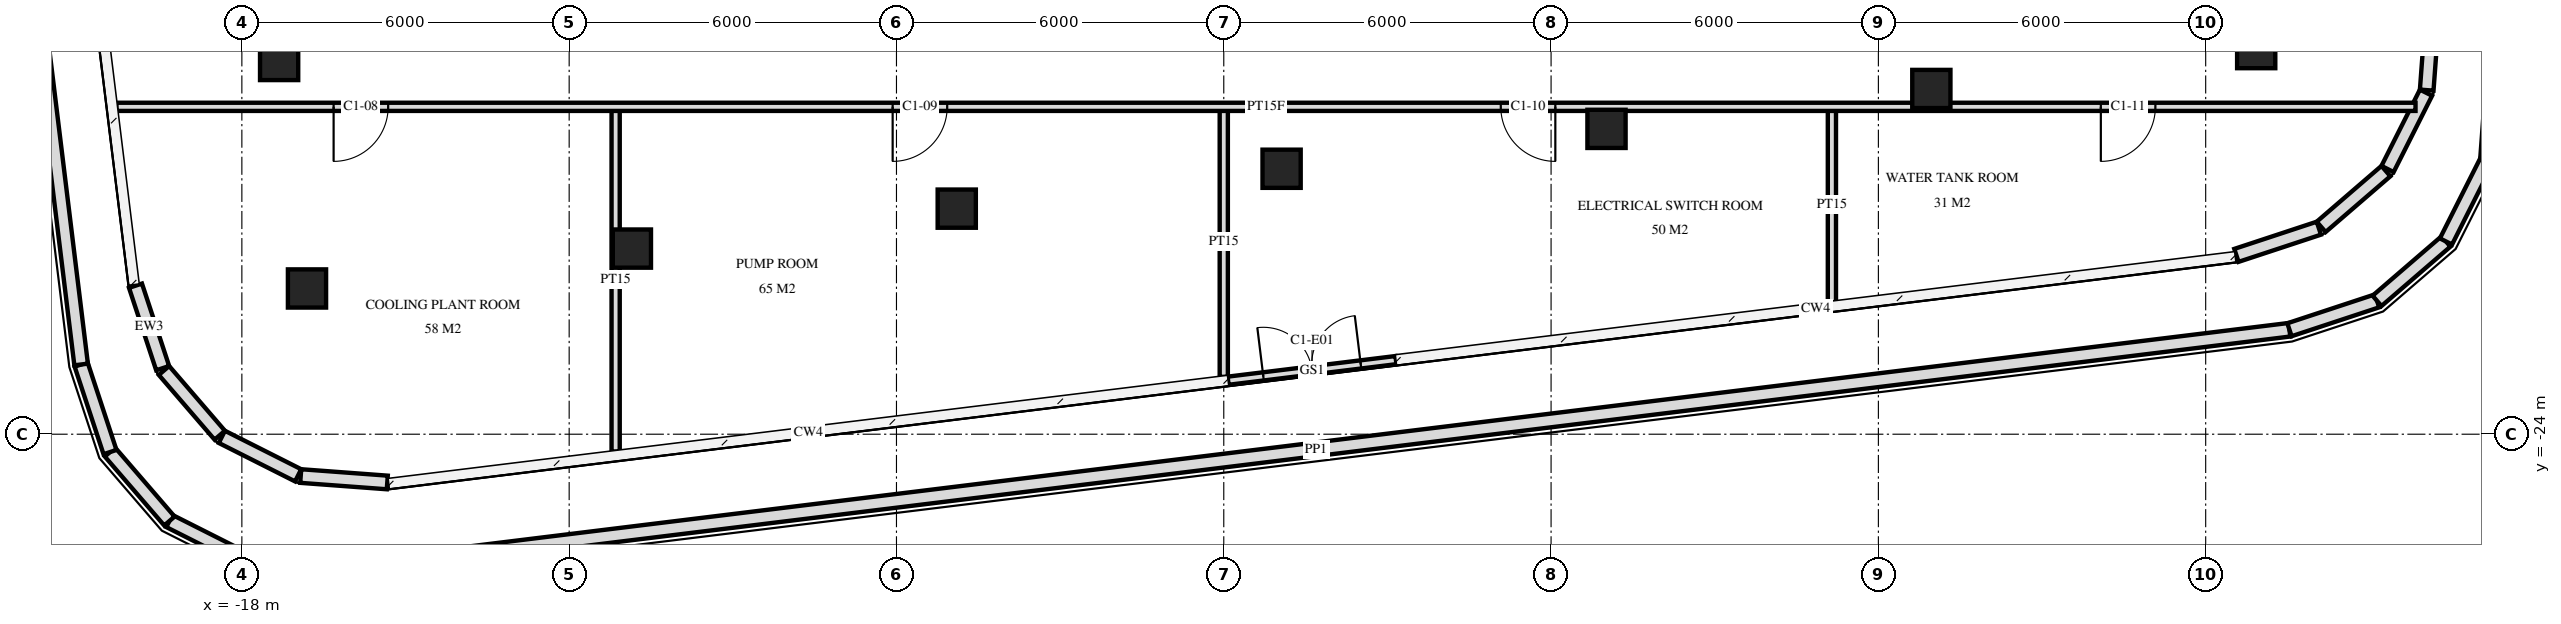
"""IFC4 building model, lengths in metres.
Left out: names, types, materials, properties, quantities, classifications, styles, units other than length and angle.
Written with IfcOpenShell. Run it as: python <this file> out.ifc"""

import sys

from ifc_helpers import new_model, si_unit, direction, frame, frame_2d, origin, origin_2d, place, context, subcontext, project, spatial, rectangle, extrude, element, fill, save


model = new_model("IFC4")
c1 = context("Model", 3, precision=1e-05, world=origin(), true_north=direction((0.0, 1.0)))
c2 = subcontext(c1, "Body", "Model", "MODEL_VIEW")
j1 = project(units=[si_unit("LENGTHUNIT", "METRE"), si_unit("PLANEANGLEUNIT", "RADIAN")], contexts=[c1])
p1 = place(None, origin())
s1 = spatial("IfcSite", under=j1, at=p1, CompositionType="ELEMENT")
p2 = place(p1, origin())
s2 = spatial("IfcBuilding", under=s1, at=p2, CompositionType="ELEMENT")
p3 = place(p2, frame((0.0, 0.0, 346.6)))
s3 = spatial("IfcBuildingStorey", under=s2, at=p3, CompositionType="ELEMENT", Elevation=346.6)
for number, where, z_axis, x_axis in (
    (1, (-17.317, -17.16, 0.0), (0.0, 0.0, 1.0), (1.0, 0.0, 0.0)),
    (2, (-16.806, -21.329, 0.0), (0.0, 0.0, 1.0), (1.0, 0.0, 0.0)),
    (3, (-10.85, -20.598, 0.0), (0.0, 0.0, 1.0), (1.0, 0.0, 0.0)),
    (4, (-4.895, -19.866, 0.0), (0.0, 0.0, 1.0), (1.0, 0.0, 0.0)),
    (5, (1.06, -19.135, 0.0), (0.0, 0.0, 1.0), (1.0, 0.0, 0.0)),
    (6, (7.016, -18.404, 0.0), (0.0, 0.0, 1.0), (1.0, 0.0, 0.0)),
    (7, (12.971, -17.673, 0.0), (0.0, 0.0, 1.0), (1.0, 0.0, 0.0)),
    (8, (18.926, -16.942, 0.0), (0.0, 0.0, 1.0), (1.0, 0.0, 0.0)),
):
    element("IfcColumn", number, at=place(p3, frame(where, z_axis=z_axis, x_axis=x_axis)), inside=s3, PredefinedType="COLUMN", context=c2, shape_type="SweptSolid", body=[
        extrude(rectangle(XDim=0.7, YDim=0.7, at=origin_2d()), origin(), (0.0, 0.0, 1.0), 3.6),
    ])
p4 = place(p3, frame((-19.95, -21.278, 0.0), z_axis=(0.0, 0.0, 1.0), x_axis=(0.313142234917, -0.949706239166, 0.0)))
e9 = element("IfcWall", 9, at=p4, inside=s3, PredefinedType="SOLIDWALL", context=c2, shape_type="SweptSolid", body=[
    extrude(rectangle(XDim=1.591, YDim=0.25, at=frame_2d((0.796, 0.0))), origin(), (0.0, 0.0, 1.0), 3.32),
])
p5 = place(p3, frame((-19.427, -22.832, 0.0), z_axis=(0.0, 0.0, 1.0), x_axis=(0.652702142905, -0.757614620138, 0.0)))
e10 = element("IfcWall", 10, at=p5, inside=s3, PredefinedType="SOLIDWALL", context=c2, shape_type="SweptSolid", body=[
    extrude(rectangle(XDim=1.566, YDim=0.25, at=frame_2d((0.783, 0.0))), origin(), (0.0, 0.0, 1.0), 3.32),
])
p6 = place(p3, frame((-18.367, -24.049, 0.0), z_axis=(0.0, 0.0, 1.0), x_axis=(0.892957249018, -0.450141479344, 0.0)))
e11 = element("IfcWall", 11, at=p6, inside=s3, PredefinedType="SOLIDWALL", context=c2, shape_type="SweptSolid", body=[
    extrude(rectangle(XDim=1.566, YDim=0.25, at=frame_2d((0.783, 0.0))), origin(), (0.0, 0.0, 1.0), 3.32),
])
p7 = place(p3, frame((-16.921, -24.767, 0.0), z_axis=(0.0, 0.0, 1.0), x_axis=(0.997250564239, -0.074103388081, 0.0)))
e12 = element("IfcWall", 12, at=p7, inside=s3, PredefinedType="SOLIDWALL", context=c2, shape_type="SweptSolid", body=[
    extrude(rectangle(XDim=1.591, YDim=0.25, at=frame_2d((0.796, 0.0))), origin(), (0.0, 0.0, 1.0), 3.32),
])
p8 = place(p3, frame((0.079, -23.02, 0.0), z_axis=(0.0, 0.0, 1.0), x_axis=(0.992542118074, 0.121902189684, 0.0)))
e13 = element("IfcWall", 13, at=p8, inside=s3, PredefinedType="USERDEFINED", context=c2, shape_type="SweptSolid", body=[
    extrude(rectangle(XDim=3.1, YDim=0.15, at=frame_2d((1.55, 0.0))), origin(), (0.0, 0.0, 1.0), 3.32),
])
p9 = place(p8, frame((0.65, 0.0, 0.0)))
e14 = element("IfcOpeningElement", 14, at=p9, cuts=e13, PredefinedType="OPENING", context=c2, shape_type="SweptSolid", body=[
    extrude(rectangle(XDim=1.8, YDim=2.4, at=frame_2d((0.9, 1.2))), frame((0.0, 0.085, 0.0), z_axis=(0.0, -1.0, 0.0), x_axis=(1.0, 0.0, 0.0)), (0.0, 0.0, 1.0), 0.17),
])
p10 = place(p3, frame((18.563, -20.723, 0.0), z_axis=(0.0, 0.0, 1.0), x_axis=(0.949660603473, 0.313280606186, 0.0)))
e15 = element("IfcWall", 15, at=p10, inside=s3, PredefinedType="SOLIDWALL", context=c2, shape_type="SweptSolid", body=[
    extrude(rectangle(XDim=1.591, YDim=0.25, at=frame_2d((0.796, 0.0))), origin(), (0.0, 0.0, 1.0), 3.32),
])
for number, where, z_axis, x_axis in (
    (16, (20.117, -20.2, 0.0), (0.0, 0.0, 1.0), (0.758, 0.653, 0.0)),
    (17, (21.334, -19.139, 0.0), (0.0, 0.0, 1.0), (0.45, 0.893, 0.0)),
):
    element("IfcWall", number, at=place(p3, frame(where, z_axis=z_axis, x_axis=x_axis)), inside=s3, PredefinedType="SOLIDWALL", context=c2, shape_type="SweptSolid", body=[
        extrude(rectangle(XDim=1.566, YDim=0.25, at=frame_2d((0.783, 0.0))), origin(), (0.0, 0.0, 1.0), 3.32),
    ])
p11 = place(p3, frame((22.052, -17.694, 0.0), z_axis=(0.0, 0.0, 1.0), x_axis=(0.074103388081, 0.997250564239, 0.0)))
e18 = element("IfcWall", 18, at=p11, inside=s3, PredefinedType="SOLIDWALL", context=c2, shape_type="SweptSolid", body=[
    extrude(rectangle(XDim=1.591, YDim=0.25, at=frame_2d((0.796, 0.0))), origin(), (0.0, 0.0, 1.0), 3.32),
])
p12 = place(p3, frame((20.947, 1.722, 0.0), z_axis=(0.0, 0.0, 1.0), x_axis=(0.12187456146, -0.992545510931, 0.0)))
e19 = element("IfcWall", 19, at=p12, inside=s3, PredefinedType="PARAPET", context=c2, shape_type="SweptSolid", body=[
    extrude(rectangle(XDim=19.157, YDim=0.25, at=frame_2d((9.578, 0.0))), origin(), (0.0, 0.0, 1.0), 1.1),
])
p13 = place(p3, frame((23.281, -17.292, 0.0), z_axis=(0.0, 0.0, 1.0), x_axis=(-0.074089798327, -0.997251573969, 0.0)))
e20 = element("IfcWall", 20, at=p13, inside=s3, PredefinedType="PARAPET", context=c2, shape_type="SweptSolid", body=[
    extrude(rectangle(XDim=1.69, YDim=0.25, at=frame_2d((0.845, 0.0))), origin(), (0.0, 0.0, 1.0), 1.1),
])
for number, where, z_axis, x_axis in (
    (21, (23.156, -18.978, 0.0), (0.0, 0.0, 1.0), (-0.45, -0.893, 0.0)),
    (22, (22.405, -20.467, 0.0), (0.0, 0.0, 1.0), (-0.758, -0.653, 0.0)),
):
    element("IfcWall", number, at=place(p3, frame(where, z_axis=z_axis, x_axis=x_axis)), inside=s3, PredefinedType="PARAPET", context=c2, shape_type="SweptSolid", body=[
        extrude(rectangle(XDim=1.668, YDim=0.25, at=frame_2d((0.834, 0.0))), origin(), (0.0, 0.0, 1.0), 1.1),
    ])
p14 = place(p3, frame((21.141, -21.556, 0.0), z_axis=(0.0, 0.0, 1.0), x_axis=(-0.949660881152, -0.313279764444, 0.0)))
e23 = element("IfcWall", 23, at=p14, inside=s3, PredefinedType="PARAPET", context=c2, shape_type="SweptSolid", body=[
    extrude(rectangle(XDim=1.69, YDim=0.25, at=frame_2d((0.845, 0.0))), origin(), (0.0, 0.0, 1.0), 1.1),
])
p15 = place(p3, frame((19.536, -22.086, 0.0), z_axis=(0.0, 0.0, 1.0), x_axis=(-0.99254678395, -0.121864193557, 0.0)))
e24 = element("IfcWall", 24, at=p15, inside=s3, PredefinedType="PARAPET", context=c2, shape_type="SweptSolid", body=[
    extrude(rectangle(XDim=35.957, YDim=0.25, at=frame_2d((17.979, 0.0))), origin(), (0.0, 0.0, 1.0), 1.1),
])
for number, where, z_axis, x_axis in (
    (25, (-17.839, -26.342, 0.0), (0.0, 0.0, 1.0), (-0.893, 0.45, 0.0)),
    (26, (-19.328, -25.591, 0.0), (0.0, 0.0, 1.0), (-0.653, 0.758, 0.0)),
):
    element("IfcWall", number, at=place(p3, frame(where, z_axis=z_axis, x_axis=x_axis)), inside=s3, PredefinedType="PARAPET", context=c2, shape_type="SweptSolid", body=[
        extrude(rectangle(XDim=1.668, YDim=0.25, at=frame_2d((0.834, 0.0))), origin(), (0.0, 0.0, 1.0), 1.1),
    ])
p16 = place(p3, frame((-20.417, -24.327, 0.0), z_axis=(0.0, 0.0, 1.0), x_axis=(-0.313149495959, 0.949703844986, 0.0)))
e27 = element("IfcWall", 27, at=p16, inside=s3, PredefinedType="PARAPET", context=c2, shape_type="SweptSolid", body=[
    extrude(rectangle(XDim=1.69, YDim=0.25, at=frame_2d((0.845, 0.0))), origin(), (0.0, 0.0, 1.0), 1.1),
])
p17 = place(p3, frame((-20.947, -22.722, 0.0), z_axis=(0.0, 0.0, 1.0), x_axis=(-0.12187456146, 0.992545510931, 0.0)))
e28 = element("IfcWall", 28, at=p17, inside=s3, PredefinedType="PARAPET", context=c2, shape_type="SweptSolid", body=[
    extrude(rectangle(XDim=19.157, YDim=0.25, at=frame_2d((9.578, 0.0))), origin(), (0.0, 0.0, 1.0), 1.1),
])
p18 = place(p3, frame((11.148, -21.58, 0.0), z_axis=(0.0, 0.0, 1.0), x_axis=(0.0, 1.0, 0.0)))
e29 = element("IfcWall", 29, at=p18, inside=s3, PredefinedType="PARTITIONING", context=c2, shape_type="SweptSolid", body=[
    extrude(rectangle(XDim=3.58, YDim=0.15, at=frame_2d((1.79, 0.0))), origin(), (0.0, 0.0, 1.0), 3.32),
])
p19 = place(p3, frame((0.0, -22.949, 0.0), z_axis=(0.0, 0.0, 1.0), x_axis=(0.0, 1.0, 0.0)))
e30 = element("IfcWall", 30, at=p19, inside=s3, PredefinedType="PARTITIONING", context=c2, shape_type="SweptSolid", body=[
    extrude(rectangle(XDim=4.949, YDim=0.15, at=frame_2d((2.474, 0.0))), origin(), (0.0, 0.0, 1.0), 3.32),
])
p20 = place(p3, frame((-11.148, -24.317, 0.0), z_axis=(0.0, 0.0, 1.0), x_axis=(0.0, 1.0, 0.0)))
e31 = element("IfcWall", 31, at=p20, inside=s3, PredefinedType="PARTITIONING", context=c2, shape_type="SweptSolid", body=[
    extrude(rectangle(XDim=6.317, YDim=0.15, at=frame_2d((3.159, 0.0))), origin(), (0.0, 0.0, 1.0), 3.32),
])
p21 = place(p3, frame((-20.299, -18.0, 0.0), z_axis=(0.0, 0.0, 1.0), x_axis=(1.0, 0.0, 0.0)))
e32 = element("IfcWall", 32, at=p21, inside=s3, PredefinedType="PARTITIONING", context=c2, shape_type="SweptSolid", body=[
    extrude(rectangle(XDim=42.146, YDim=0.15, at=frame_2d((21.073, 0.0))), origin(), (0.0, 0.0, 1.0), 3.32),
])
p22 = place(p21, frame((3.981, 0.0, 0.0)))
e33 = element("IfcOpeningElement", 33, at=p22, cuts=e32, PredefinedType="OPENING", context=c2, shape_type="SweptSolid", body=[
    extrude(rectangle(XDim=1.0, YDim=2.1, at=frame_2d((0.5, 1.05))), frame((0.0, 0.085, 0.0), z_axis=(0.0, -1.0, 0.0), x_axis=(1.0, 0.0, 0.0)), (0.0, 0.0, 1.0), 0.17),
])
p23 = place(p21, frame((14.229, 0.0, 0.0)))
e34 = element("IfcOpeningElement", 34, at=p23, cuts=e32, PredefinedType="OPENING", context=c2, shape_type="SweptSolid", body=[
    extrude(rectangle(XDim=1.0, YDim=2.1, at=frame_2d((0.5, 1.05))), frame((0.0, 0.085, 0.0), z_axis=(0.0, -1.0, 0.0), x_axis=(1.0, 0.0, 0.0)), (0.0, 0.0, 1.0), 0.17),
])
p24 = place(p21, frame((25.377, 0.0, 0.0)))
e35 = element("IfcOpeningElement", 35, at=p24, cuts=e32, PredefinedType="OPENING", context=c2, shape_type="SweptSolid", body=[
    extrude(rectangle(XDim=1.0, YDim=2.1, at=frame_2d((0.5, 1.05))), frame((0.0, 0.085, 0.0), z_axis=(0.0, -1.0, 0.0), x_axis=(1.0, 0.0, 0.0)), (0.0, 0.0, 1.0), 0.17),
])
p25 = place(p21, frame((36.377, 0.0, 0.0)))
e36 = element("IfcOpeningElement", 36, at=p25, cuts=e32, PredefinedType="OPENING", context=c2, shape_type="SweptSolid", body=[
    extrude(rectangle(XDim=1.0, YDim=2.1, at=frame_2d((0.5, 1.05))), frame((0.0, 0.085, 0.0), z_axis=(0.0, -1.0, 0.0), x_axis=(1.0, 0.0, 0.0)), (0.0, 0.0, 1.0), 0.17),
])
p26 = place(p9, origin())
e37 = element("IfcDoor", 37, at=p26, inside=s3, OperationType="DOUBLE_DOOR_SINGLE_SWING", PredefinedType="DOOR", context=c2, shape_type="SweptSolid", body=[
    extrude(rectangle(XDim=1.8, YDim=2.4, at=frame_2d((0.9, 1.2))), frame((0.0, 0.025, 0.0), z_axis=(0.0, -1.0, 0.0), x_axis=(1.0, 0.0, 0.0)), (0.0, 0.0, 1.0), 0.05),
])
fill(e14, e37)
p27 = place(p22, frame((0.5, 0.0, 0.0), z_axis=(0.0, 0.0, 1.0), x_axis=(-1.0, 0.0, 0.0)))
e38 = element("IfcDoor", 38, at=p27, inside=s3, OperationType="SINGLE_SWING_LEFT", PredefinedType="DOOR", context=c2, shape_type="SweptSolid", body=[
    extrude(rectangle(XDim=1.0, YDim=2.1, at=frame_2d((0.0, 1.05))), frame((0.0, -0.025, 0.0), z_axis=(0.0, 1.0, 0.0), x_axis=(-1.0, 0.0, 0.0)), (0.0, 0.0, 1.0), 0.05),
])
fill(e33, e38)
p28 = place(p23, frame((0.5, 0.0, 0.0), z_axis=(0.0, 0.0, 1.0), x_axis=(-1.0, 0.0, 0.0)))
e39 = element("IfcDoor", 39, at=p28, inside=s3, OperationType="SINGLE_SWING_LEFT", PredefinedType="DOOR", context=c2, shape_type="SweptSolid", body=[
    extrude(rectangle(XDim=1.0, YDim=2.1, at=frame_2d((0.0, 1.05))), frame((0.0, -0.025, 0.0), z_axis=(0.0, 1.0, 0.0), x_axis=(-1.0, 0.0, 0.0)), (0.0, 0.0, 1.0), 0.05),
])
fill(e34, e39)
p29 = place(p24, frame((0.5, 0.0, 0.0), z_axis=(0.0, 0.0, 1.0), x_axis=(-1.0, 0.0, 0.0)))
e40 = element("IfcDoor", 40, at=p29, inside=s3, OperationType="SINGLE_SWING_RIGHT", PredefinedType="DOOR", context=c2, shape_type="SweptSolid", body=[
    extrude(rectangle(XDim=1.0, YDim=2.1, at=frame_2d((0.0, 1.05))), frame((0.0, -0.025, 0.0), z_axis=(0.0, 1.0, 0.0), x_axis=(-1.0, 0.0, 0.0)), (0.0, 0.0, 1.0), 0.05),
])
fill(e35, e40)
p30 = place(p25, frame((0.5, 0.0, 0.0), z_axis=(0.0, 0.0, 1.0), x_axis=(-1.0, 0.0, 0.0)))
e41 = element("IfcDoor", 41, at=p30, inside=s3, OperationType="SINGLE_SWING_LEFT", PredefinedType="DOOR", context=c2, shape_type="SweptSolid", body=[
    extrude(rectangle(XDim=1.0, YDim=2.1, at=frame_2d((0.0, 1.05))), frame((0.0, -0.025, 0.0), z_axis=(0.0, 1.0, 0.0), x_axis=(-1.0, 0.0, 0.0)), (0.0, 0.0, 1.0), 0.05),
])
fill(e36, e41)
save(model, sys.argv[1])
